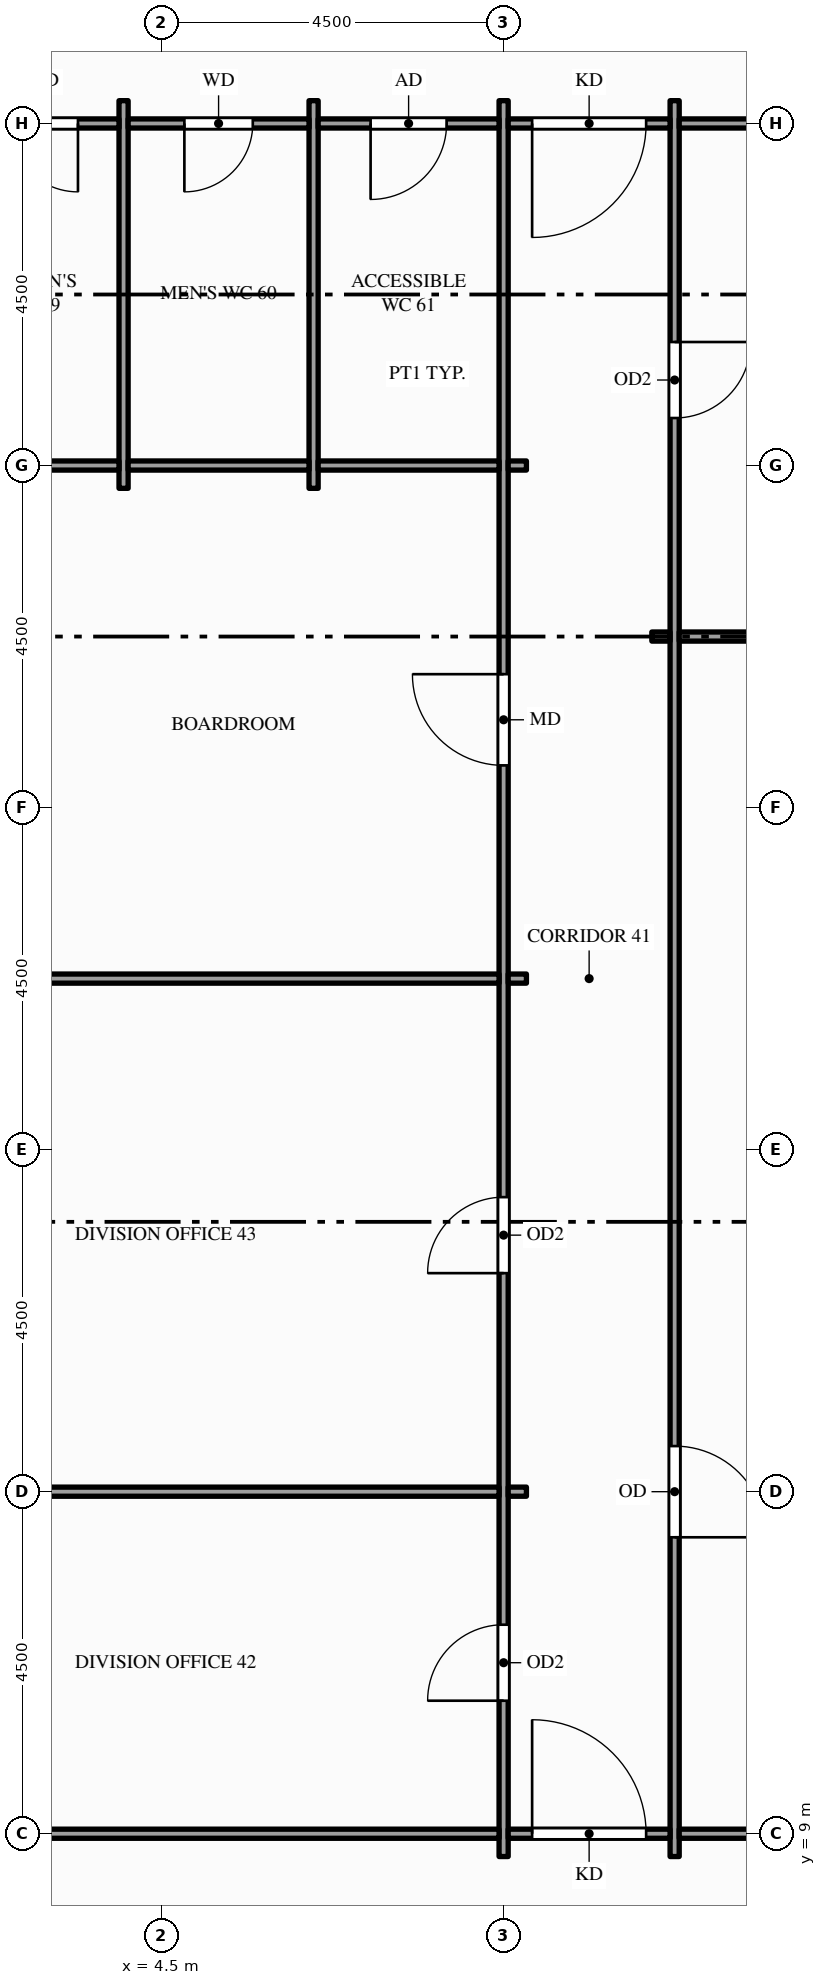
"""IFC4 building model, lengths in metres.
Left out: names, types, materials, properties, quantities, classifications, styles, units other than length and angle.
Written with IfcOpenShell. Run it as: python <this file> out.ifc"""

import sys

from ifc_helpers import new_model, si_unit, direction, frame, frame_2d, origin, place, context, subcontext, project, spatial, rectangle, extrude, element, fill, save


model = new_model("IFC4")
c1 = context("Model", 3, precision=1e-05, world=origin(), true_north=direction((0.0, 1.0)))
c2 = subcontext(c1, "Body", "Model", "MODEL_VIEW")
j1 = project(units=[si_unit("LENGTHUNIT", "METRE"), si_unit("PLANEANGLEUNIT", "RADIAN")], contexts=[c1])
p1 = place(None, origin())
s1 = spatial("IfcSite", under=j1, at=p1, CompositionType="ELEMENT")
p2 = place(p1, origin())
s2 = spatial("IfcBuilding", under=s1, at=p2, CompositionType="ELEMENT")
p3 = place(p2, frame((0.0, 0.0, 107.0)))
s3 = spatial("IfcBuildingStorey", under=s2, at=p3, CompositionType="ELEMENT", Elevation=107.0)
for number, where, z_axis, x_axis in (
    (1, (4.0, 26.7, 0.0), (0.0, 0.0, 1.0), (0.0, 1.0, 0.0)),
    (2, (6.5, 26.7, 0.0), (0.0, 0.0, 1.0), (0.0, 1.0, 0.0)),
):
    element("IfcWall", number, at=place(p3, frame(where, z_axis=z_axis, x_axis=x_axis)), inside=s3, PredefinedType="PARTITIONING", context=c2, shape_type="SweptSolid", body=[
        extrude(rectangle(XDim=5.1, YDim=0.12, at=frame_2d((2.55, 0.0))), origin(), (0.0, 0.0, 1.0), 3.85),
    ])
p4 = place(p3, frame((9.0, 8.7, 0.0), z_axis=(0.0, 0.0, 1.0), x_axis=(0.0, 1.0, 0.0)))
e3 = element("IfcWall", 3, at=p4, inside=s3, PredefinedType="PARTITIONING", context=c2, shape_type="SweptSolid", body=[
    extrude(rectangle(XDim=23.1, YDim=0.12, at=frame_2d((11.55, 0.0))), origin(), (0.0, 0.0, 1.0), 2.6),
])
p5 = place(p4, frame((2.05, 0.0, 0.0)))
e4 = element("IfcOpeningElement", 4, at=p5, cuts=e3, PredefinedType="OPENING", context=c2, shape_type="SweptSolid", body=[
    extrude(rectangle(XDim=1.0, YDim=2.1, at=frame_2d((0.5, 1.05))), frame((0.0, 0.07, 0.0), z_axis=(0.0, -1.0, 0.0), x_axis=(1.0, 0.0, 0.0)), (0.0, 0.0, 1.0), 0.14),
])
p6 = place(p4, frame((7.675, 0.0, 0.0)))
e5 = element("IfcOpeningElement", 5, at=p6, cuts=e3, PredefinedType="OPENING", context=c2, shape_type="SweptSolid", body=[
    extrude(rectangle(XDim=1.0, YDim=2.1, at=frame_2d((0.5, 1.05))), frame((0.0, 0.07, 0.0), z_axis=(0.0, -1.0, 0.0), x_axis=(1.0, 0.0, 0.0)), (0.0, 0.0, 1.0), 0.14),
])
p7 = place(p4, frame((14.355, 0.0, 0.0)))
e6 = element("IfcOpeningElement", 6, at=p7, cuts=e3, PredefinedType="OPENING", context=c2, shape_type="SweptSolid", body=[
    extrude(rectangle(XDim=1.2, YDim=2.1, at=frame_2d((0.6, 1.05))), frame((0.0, 0.07, 0.0), z_axis=(0.0, -1.0, 0.0), x_axis=(1.0, 0.0, 0.0)), (0.0, 0.0, 1.0), 0.14),
])
p8 = place(p3, frame((11.25, 8.7, 0.0), z_axis=(0.0, 0.0, 1.0), x_axis=(0.0, 1.0, 0.0)))
e7 = element("IfcWall", 7, at=p8, inside=s3, PredefinedType="PARTITIONING", context=c2, shape_type="SweptSolid", body=[
    extrude(rectangle(XDim=23.1, YDim=0.12, at=frame_2d((11.55, 0.0))), origin(), (0.0, 0.0, 1.0), 2.6),
])
p9 = place(p8, frame((18.925, 0.0, 0.0)))
e8 = element("IfcOpeningElement", 8, at=p9, cuts=e7, PredefinedType="OPENING", context=c2, shape_type="SweptSolid", body=[
    extrude(rectangle(XDim=1.0, YDim=2.1, at=frame_2d((0.5, 1.05))), frame((0.0, 0.07, 0.0), z_axis=(0.0, -1.0, 0.0), x_axis=(1.0, 0.0, 0.0)), (0.0, 0.0, 1.0), 0.14),
])
p10 = place(p8, frame((4.2, 0.0, 0.0)))
e9 = element("IfcOpeningElement", 9, at=p10, cuts=e7, PredefinedType="OPENING", context=c2, shape_type="SweptSolid", body=[
    extrude(rectangle(XDim=1.2, YDim=2.1, at=frame_2d((0.6, 1.05))), frame((0.0, 0.07, 0.0), z_axis=(0.0, -1.0, 0.0), x_axis=(1.0, 0.0, 0.0)), (0.0, 0.0, 1.0), 0.14),
])
p11 = place(p3, frame((0.15, 9.0, 0.0), z_axis=(0.0, 0.0, 1.0), x_axis=(1.0, 0.0, 0.0)))
e10 = element("IfcWall", 10, at=p11, inside=s3, PredefinedType="PARTITIONING", context=c2, shape_type="SweptSolid", body=[
    extrude(rectangle(XDim=8.79, YDim=0.12, at=frame_2d((4.395, 0.0))), origin(), (0.0, 0.0, 1.0), 2.938),
])
p12 = place(p3, frame((9.06, 9.0, 0.0), z_axis=(0.0, 0.0, 1.0), x_axis=(1.0, 0.0, 0.0)))
e11 = element("IfcWall", 11, at=p12, inside=s3, PredefinedType="PARTITIONING", context=c2, shape_type="SweptSolid", body=[
    extrude(rectangle(XDim=2.13, YDim=0.12, at=frame_2d((1.065, 0.0))), origin(), (0.0, 0.0, 1.0), 2.938),
])
p13 = place(p12, frame((0.315, 0.0, 0.0)))
e12 = element("IfcOpeningElement", 12, at=p13, cuts=e11, PredefinedType="OPENING", context=c2, shape_type="SweptSolid", body=[
    extrude(rectangle(XDim=1.5, YDim=2.1, at=frame_2d((0.75, 1.05))), frame((0.0, 0.07, 0.0), z_axis=(0.0, -1.0, 0.0), x_axis=(1.0, 0.0, 0.0)), (0.0, 0.0, 1.0), 0.14),
])
p14 = place(p3, frame((11.31, 9.0, 0.0), z_axis=(0.0, 0.0, 1.0), x_axis=(1.0, 0.0, 0.0)))
e13 = element("IfcWall", 13, at=p14, inside=s3, PredefinedType="PARTITIONING", context=c2, shape_type="SweptSolid", body=[
    extrude(rectangle(XDim=20.13, YDim=0.12, at=frame_2d((10.065, 0.0))), origin(), (0.0, 0.0, 1.0), 2.76),
])
p15 = place(p14, frame((3.54, 0.0, 0.0)))
e14 = element("IfcOpeningElement", 14, at=p15, cuts=e13, PredefinedType="OPENING", context=c2, shape_type="SweptSolid", body=[
    extrude(rectangle(XDim=1.8, YDim=2.1, at=frame_2d((0.9, 1.05))), frame((0.0, 0.07, 0.0), z_axis=(0.0, -1.0, 0.0), x_axis=(1.0, 0.0, 0.0)), (0.0, 0.0, 1.0), 0.14),
])
p16 = place(p3, frame((0.15, 13.5, 0.0), z_axis=(0.0, 0.0, 1.0), x_axis=(1.0, 0.0, 0.0)))
e15 = element("IfcWall", 15, at=p16, inside=s3, PredefinedType="PARTITIONING", context=c2, shape_type="SweptSolid", body=[
    extrude(rectangle(XDim=8.79, YDim=0.12, at=frame_2d((4.395, 0.0))), origin(), (0.0, 0.0, 1.0), 2.938),
])
p17 = place(p3, frame((9.06, 13.5, 0.0), z_axis=(0.0, 0.0, 1.0), x_axis=(1.0, 0.0, 0.0)))
e16 = element("IfcWall", 16, at=p17, inside=s3, PredefinedType="PARTITIONING", context=c2, shape_type="SweptSolid", body=[
    extrude(rectangle(XDim=0.24, YDim=0.12, at=frame_2d((0.12, 0.0))), origin(), (0.0, 0.0, 1.0), 2.938),
])
p18 = place(p3, frame((0.15, 20.25, 0.0), z_axis=(0.0, 0.0, 1.0), x_axis=(1.0, 0.0, 0.0)))
e17 = element("IfcWall", 17, at=p18, inside=s3, PredefinedType="PARTITIONING", context=c2, shape_type="SweptSolid", body=[
    extrude(rectangle(XDim=8.79, YDim=0.12, at=frame_2d((4.395, 0.0))), origin(), (0.0, 0.0, 1.0), 2.938),
])
for number, where, z_axis, x_axis in (
    (18, (9.06, 20.25, 0.0), (0.0, 0.0, 1.0), (1.0, 0.0, 0.0)),
    (19, (10.95, 24.75, 0.0), (0.0, 0.0, 1.0), (1.0, 0.0, 0.0)),
):
    element("IfcWall", number, at=place(p3, frame(where, z_axis=z_axis, x_axis=x_axis)), inside=s3, PredefinedType="PARTITIONING", context=c2, shape_type="SweptSolid", body=[
        extrude(rectangle(XDim=0.24, YDim=0.12, at=frame_2d((0.12, 0.0))), origin(), (0.0, 0.0, 1.0), 2.938),
    ])
p19 = place(p3, frame((11.31, 24.75, 0.0), z_axis=(0.0, 0.0, 1.0), x_axis=(1.0, 0.0, 0.0)))
e20 = element("IfcWall", 20, at=p19, inside=s3, PredefinedType="PARTITIONING", context=c2, shape_type="SweptSolid", body=[
    extrude(rectangle(XDim=12.637, YDim=0.12, at=frame_2d((6.319, 0.0))), origin(), (0.0, 0.0, 1.0), 2.938),
])
p20 = place(p3, frame((1.65, 27.0, 0.0), z_axis=(0.0, 0.0, 1.0), x_axis=(1.0, 0.0, 0.0)))
e21 = element("IfcWall", 21, at=p20, inside=s3, PredefinedType="PARTITIONING", context=c2, shape_type="SweptSolid", body=[
    extrude(rectangle(XDim=2.29, YDim=0.12, at=frame_2d((1.145, 0.0))), origin(), (0.0, 0.0, 1.0), 2.938),
])
for number, where, z_axis, x_axis in (
    (22, (4.06, 27.0, 0.0), (0.0, 0.0, 1.0), (1.0, 0.0, 0.0)),
    (23, (6.56, 27.0, 0.0), (0.0, 0.0, 1.0), (1.0, 0.0, 0.0)),
):
    element("IfcWall", number, at=place(p3, frame(where, z_axis=z_axis, x_axis=x_axis)), inside=s3, PredefinedType="PARTITIONING", context=c2, shape_type="SweptSolid", body=[
        extrude(rectangle(XDim=2.38, YDim=0.12, at=frame_2d((1.19, 0.0))), origin(), (0.0, 0.0, 1.0), 2.938),
    ])
p21 = place(p3, frame((9.06, 27.0, 0.0), z_axis=(0.0, 0.0, 1.0), x_axis=(1.0, 0.0, 0.0)))
e24 = element("IfcWall", 24, at=p21, inside=s3, PredefinedType="PARTITIONING", context=c2, shape_type="SweptSolid", body=[
    extrude(rectangle(XDim=0.24, YDim=0.12, at=frame_2d((0.12, 0.0))), origin(), (0.0, 0.0, 1.0), 2.938),
])
p22 = place(p3, frame((1.65, 31.5, 0.0), z_axis=(0.0, 0.0, 1.0), x_axis=(1.0, 0.0, 0.0)))
e25 = element("IfcWall", 25, at=p22, inside=s3, PredefinedType="PARTITIONING", context=c2, shape_type="SweptSolid", body=[
    extrude(rectangle(XDim=2.29, YDim=0.12, at=frame_2d((1.145, 0.0))), origin(), (0.0, 0.0, 1.0), 2.938),
])
p23 = place(p22, frame((0.85, 0.0, 0.0)))
e26 = element("IfcOpeningElement", 26, at=p23, cuts=e25, PredefinedType="OPENING", context=c2, shape_type="SweptSolid", body=[
    extrude(rectangle(XDim=0.9, YDim=2.1, at=frame_2d((0.45, 1.05))), frame((0.0, 0.07, 0.0), z_axis=(0.0, -1.0, 0.0), x_axis=(1.0, 0.0, 0.0)), (0.0, 0.0, 1.0), 0.14),
])
p24 = place(p3, frame((4.06, 31.5, 0.0), z_axis=(0.0, 0.0, 1.0), x_axis=(1.0, 0.0, 0.0)))
e27 = element("IfcWall", 27, at=p24, inside=s3, PredefinedType="PARTITIONING", context=c2, shape_type="SweptSolid", body=[
    extrude(rectangle(XDim=2.38, YDim=0.12, at=frame_2d((1.19, 0.0))), origin(), (0.0, 0.0, 1.0), 2.938),
])
p25 = place(p24, frame((0.74, 0.0, 0.0)))
e28 = element("IfcOpeningElement", 28, at=p25, cuts=e27, PredefinedType="OPENING", context=c2, shape_type="SweptSolid", body=[
    extrude(rectangle(XDim=0.9, YDim=2.1, at=frame_2d((0.45, 1.05))), frame((0.0, 0.07, 0.0), z_axis=(0.0, -1.0, 0.0), x_axis=(1.0, 0.0, 0.0)), (0.0, 0.0, 1.0), 0.14),
])
p26 = place(p3, frame((6.56, 31.5, 0.0), z_axis=(0.0, 0.0, 1.0), x_axis=(1.0, 0.0, 0.0)))
e29 = element("IfcWall", 29, at=p26, inside=s3, PredefinedType="PARTITIONING", context=c2, shape_type="SweptSolid", body=[
    extrude(rectangle(XDim=2.38, YDim=0.12, at=frame_2d((1.19, 0.0))), origin(), (0.0, 0.0, 1.0), 2.938),
])
p27 = place(p26, frame((0.69, 0.0, 0.0)))
e30 = element("IfcOpeningElement", 30, at=p27, cuts=e29, PredefinedType="OPENING", context=c2, shape_type="SweptSolid", body=[
    extrude(rectangle(XDim=1.0, YDim=2.1, at=frame_2d((0.5, 1.05))), frame((0.0, 0.07, 0.0), z_axis=(0.0, -1.0, 0.0), x_axis=(1.0, 0.0, 0.0)), (0.0, 0.0, 1.0), 0.14),
])
p28 = place(p3, frame((9.06, 31.5, 0.0), z_axis=(0.0, 0.0, 1.0), x_axis=(1.0, 0.0, 0.0)))
e31 = element("IfcWall", 31, at=p28, inside=s3, PredefinedType="PARTITIONING", context=c2, shape_type="SweptSolid", body=[
    extrude(rectangle(XDim=2.13, YDim=0.12, at=frame_2d((1.065, 0.0))), origin(), (0.0, 0.0, 1.0), 2.938),
])
p29 = place(p28, frame((0.315, 0.0, 0.0)))
e32 = element("IfcOpeningElement", 32, at=p29, cuts=e31, PredefinedType="OPENING", context=c2, shape_type="SweptSolid", body=[
    extrude(rectangle(XDim=1.5, YDim=2.1, at=frame_2d((0.75, 1.05))), frame((0.0, 0.07, 0.0), z_axis=(0.0, -1.0, 0.0), x_axis=(1.0, 0.0, 0.0)), (0.0, 0.0, 1.0), 0.14),
])
p30 = place(p3, frame((11.31, 31.5, 0.0), z_axis=(0.0, 0.0, 1.0), x_axis=(1.0, 0.0, 0.0)))
e33 = element("IfcWall", 33, at=p30, inside=s3, PredefinedType="PARTITIONING", context=c2, shape_type="SweptSolid", body=[
    extrude(rectangle(XDim=12.54, YDim=0.12, at=frame_2d((6.27, 0.0))), origin(), (0.0, 0.0, 1.0), 2.938),
])
p31 = place(p13, origin())
e34 = element("IfcDoor", 34, at=p31, inside=s3, OperationType="SINGLE_SWING_LEFT", PredefinedType="DOOR", context=c2, shape_type="SweptSolid", body=[
    extrude(rectangle(XDim=1.5, YDim=2.1, at=frame_2d((0.75, 1.05))), frame((0.0, 0.025, 0.0), z_axis=(0.0, -1.0, 0.0), x_axis=(1.0, 0.0, 0.0)), (0.0, 0.0, 1.0), 0.05),
])
fill(e12, e34)
p32 = place(p29, origin())
e35 = element("IfcDoor", 35, at=p32, inside=s3, OperationType="SINGLE_SWING_LEFT", PredefinedType="DOOR", context=c2, shape_type="SweptSolid", body=[
    extrude(rectangle(XDim=1.5, YDim=2.1, at=frame_2d((0.75, 1.05))), frame((0.0, 0.025, 0.0), z_axis=(0.0, -1.0, 0.0), x_axis=(1.0, 0.0, 0.0)), (0.0, 0.0, 1.0), 0.05),
])
fill(e32, e35)
p33 = place(p5, origin())
e36 = element("IfcDoor", 36, at=p33, inside=s3, OperationType="SINGLE_SWING_LEFT", PredefinedType="DOOR", context=c2, shape_type="SweptSolid", body=[
    extrude(rectangle(XDim=1.0, YDim=2.1, at=frame_2d((0.5, 1.05))), frame((0.0, 0.025, 0.0), z_axis=(0.0, -1.0, 0.0), x_axis=(1.0, 0.0, 0.0)), (0.0, 0.0, 1.0), 0.05),
])
fill(e4, e36)
p34 = place(p6, origin())
e37 = element("IfcDoor", 37, at=p34, inside=s3, OperationType="SINGLE_SWING_LEFT", PredefinedType="DOOR", context=c2, shape_type="SweptSolid", body=[
    extrude(rectangle(XDim=1.0, YDim=2.1, at=frame_2d((0.5, 1.05))), frame((0.0, 0.025, 0.0), z_axis=(0.0, -1.0, 0.0), x_axis=(1.0, 0.0, 0.0)), (0.0, 0.0, 1.0), 0.05),
])
fill(e5, e37)
p35 = place(p7, origin())
e38 = element("IfcDoor", 38, at=p35, inside=s3, OperationType="SINGLE_SWING_RIGHT", PredefinedType="DOOR", context=c2, shape_type="SweptSolid", body=[
    extrude(rectangle(XDim=1.2, YDim=2.1, at=frame_2d((0.6, 1.05))), frame((0.0, 0.025, 0.0), z_axis=(0.0, -1.0, 0.0), x_axis=(1.0, 0.0, 0.0)), (0.0, 0.0, 1.0), 0.05),
])
fill(e6, e38)
p36 = place(p23, origin())
e39 = element("IfcDoor", 39, at=p36, inside=s3, OperationType="SINGLE_SWING_RIGHT", PredefinedType="DOOR", context=c2, shape_type="SweptSolid", body=[
    extrude(rectangle(XDim=0.9, YDim=2.1, at=frame_2d((0.45, 1.05))), frame((0.0, 0.025, 0.0), z_axis=(0.0, -1.0, 0.0), x_axis=(1.0, 0.0, 0.0)), (0.0, 0.0, 1.0), 0.05),
])
fill(e26, e39)
p37 = place(p25, origin())
e40 = element("IfcDoor", 40, at=p37, inside=s3, OperationType="SINGLE_SWING_LEFT", PredefinedType="DOOR", context=c2, shape_type="SweptSolid", body=[
    extrude(rectangle(XDim=0.9, YDim=2.1, at=frame_2d((0.45, 1.05))), frame((0.0, 0.025, 0.0), z_axis=(0.0, -1.0, 0.0), x_axis=(1.0, 0.0, 0.0)), (0.0, 0.0, 1.0), 0.05),
])
fill(e28, e40)
p38 = place(p27, origin())
e41 = element("IfcDoor", 41, at=p38, inside=s3, OperationType="SINGLE_SWING_LEFT", PredefinedType="DOOR", context=c2, shape_type="SweptSolid", body=[
    extrude(rectangle(XDim=1.0, YDim=2.1, at=frame_2d((0.5, 1.05))), frame((0.0, 0.025, 0.0), z_axis=(0.0, -1.0, 0.0), x_axis=(1.0, 0.0, 0.0)), (0.0, 0.0, 1.0), 0.05),
])
fill(e30, e41)
p39 = place(p9, origin())
e42 = element("IfcDoor", 42, at=p39, inside=s3, OperationType="SINGLE_SWING_RIGHT", PredefinedType="DOOR", context=c2, shape_type="SweptSolid", body=[
    extrude(rectangle(XDim=1.0, YDim=2.1, at=frame_2d((0.5, 1.05))), frame((0.0, 0.025, 0.0), z_axis=(0.0, -1.0, 0.0), x_axis=(1.0, 0.0, 0.0)), (0.0, 0.0, 1.0), 0.05),
])
fill(e8, e42)
p40 = place(p10, origin())
e43 = element("IfcDoor", 43, at=p40, inside=s3, OperationType="SINGLE_SWING_LEFT", PredefinedType="DOOR", context=c2, shape_type="SweptSolid", body=[
    extrude(rectangle(XDim=1.2, YDim=2.1, at=frame_2d((0.6, 1.05))), frame((0.0, 0.025, 0.0), z_axis=(0.0, -1.0, 0.0), x_axis=(1.0, 0.0, 0.0)), (0.0, 0.0, 1.0), 0.05),
])
fill(e9, e43)
save(model, sys.argv[1])
